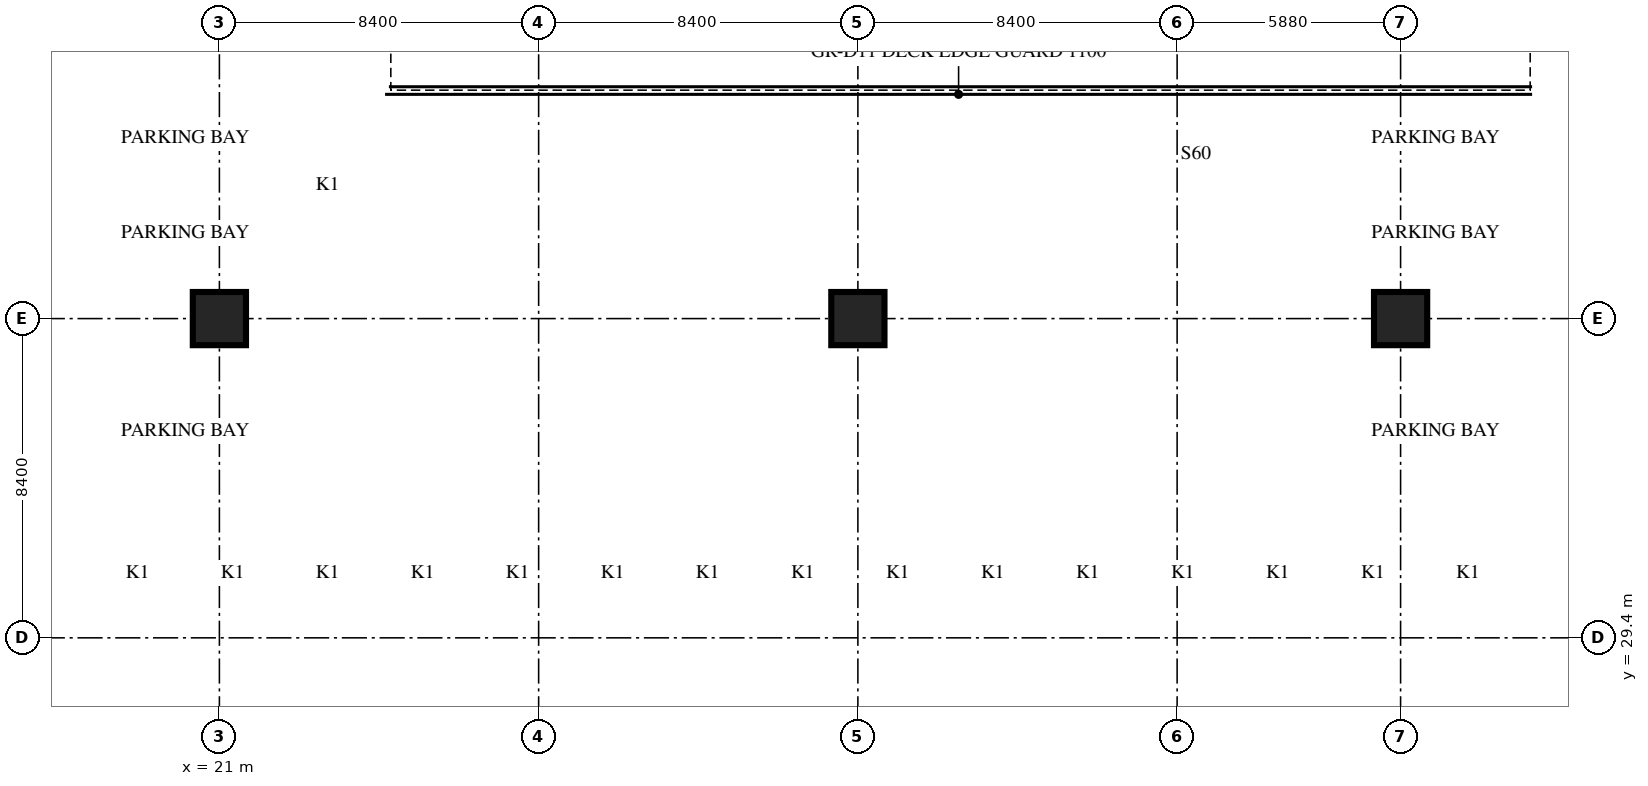
"""IFC4 building model, lengths in metres.
Left out: names, types, materials, properties, quantities, classifications, styles, units other than length and angle.
Written with IfcOpenShell. Run it as: python <this file> out.ifc"""

import sys

from ifc_helpers import new_model, si_unit, direction, frame, origin, origin_2d, place, context, subcontext, project, spatial, rectangle, extrude, source, transform, mapped, element, save


model = new_model("IFC4")
c1 = context("Model", 3, precision=1e-05, world=origin(), true_north=direction((0.0, 1.0)))
c2 = subcontext(c1, "Body", "Model", "MODEL_VIEW")
j1 = project(units=[si_unit("LENGTHUNIT", "METRE"), si_unit("PLANEANGLEUNIT", "RADIAN")], contexts=[c1])
p1 = place(None, origin())
s1 = spatial("IfcSite", under=j1, at=p1, CompositionType="ELEMENT")
p2 = place(p1, origin())
s2 = spatial("IfcBuilding", under=s1, at=p2, CompositionType="ELEMENT")
p3 = place(p2, frame((0.0, 0.0, -9.0)))
s3 = spatial("IfcBuildingStorey", under=s2, at=p3, CompositionType="ELEMENT", Elevation=-9.0)
m1 = source(origin(), c2, "Body", "SweptSolid", [
    extrude(rectangle(XDim=1.4, YDim=1.4, at=origin_2d()), origin(), (0.0, 0.0, 1.0), 4.5),
])
for number, where, z_axis, x_axis in (
    (1, (21.0, 37.8, 0.0), (0.0, 0.0, 1.0), (1.0, 0.0, 0.0)),
    (2, (37.8, 37.8, 0.0), (0.0, 0.0, 1.0), (1.0, 0.0, 0.0)),
    (3, (52.08, 37.8, 0.0), (0.0, 0.0, 1.0), (1.0, 0.0, 0.0)),
):
    element("IfcColumn", number, at=place(p3, frame(where, z_axis=z_axis, x_axis=x_axis)), inside=s3, PredefinedType="COLUMN", context=c2, shape_type="MappedRepresentation", body=[
        mapped(m1, transform((0.0, 0.0, 0.0), scale=1.0)),
    ])
save(model, sys.argv[1])
